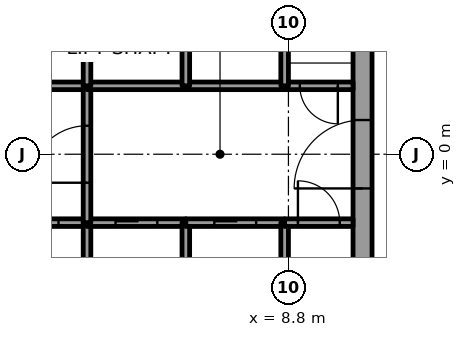
"""IFC4 building model, lengths in metres.
Left out: names, types, materials, properties, quantities, classifications, styles, units other than length and angle.
Written with IfcOpenShell. Run it as: python <this file> out.ifc"""

import sys

from ifc_helpers import new_model, si_unit, direction, frame, frame_2d, origin, place, context, subcontext, project, spatial, rectangle, extrude, element, fill, save


model = new_model("IFC4")
c1 = context("Model", 3, precision=1e-05, world=origin(), true_north=direction((0.0, 1.0)))
c2 = subcontext(c1, "Body", "Model", "MODEL_VIEW")
j1 = project(units=[si_unit("LENGTHUNIT", "METRE"), si_unit("PLANEANGLEUNIT", "RADIAN")], contexts=[c1])
p1 = place(None, origin())
s1 = spatial("IfcSite", under=j1, at=p1, CompositionType="ELEMENT")
p2 = place(p1, origin())
s2 = spatial("IfcBuilding", under=s1, at=p2, CompositionType="ELEMENT")
p3 = place(p2, frame((0.0, 0.0, 70.2)))
s3 = spatial("IfcBuildingStorey", under=s2, at=p3, CompositionType="ELEMENT", Elevation=70.2)
p4 = place(p3, frame((10.75, -7.5, 0.0), z_axis=(0.0, 0.0, 1.0), x_axis=(0.0, 1.0, 0.0)))
e1 = element("IfcWall", 1, at=p4, inside=s3, PredefinedType="SHEAR", context=c2, shape_type="SweptSolid", body=[
    extrude(rectangle(XDim=15.0, YDim=0.5, at=frame_2d((7.5, 0.0))), origin(), (0.0, 0.0, 1.0), 3.7),
])
p5 = place(p4, frame((6.6, 0.0, 0.0)))
e2 = element("IfcOpeningElement", 2, at=p5, cuts=e1, PredefinedType="OPENING", context=c2, shape_type="SweptSolid", body=[
    extrude(rectangle(XDim=1.8, YDim=2.1, at=frame_2d((0.9, 1.05))), frame((0.0, 0.25, 0.0), z_axis=(0.0, -1.0, 0.0), x_axis=(1.0, 0.0, 0.0)), (0.0, 0.0, 1.0), 0.5),
])
p6 = place(p3, frame((0.9, -1.8, 0.0), z_axis=(0.0, 0.0, 1.0), x_axis=(1.0, 0.0, 0.0)))
e3 = element("IfcWall", 3, at=p6, inside=s3, PredefinedType="SOLIDWALL", context=c2, shape_type="SweptSolid", body=[
    extrude(rectangle(XDim=2.6, YDim=0.2, at=frame_2d((1.3, 0.0))), origin(), (0.0, 0.0, 1.0), 3.55),
])
p7 = place(p6, frame((0.75, 0.0, 0.0)))
e4 = element("IfcOpeningElement", 4, at=p7, cuts=e3, PredefinedType="OPENING", context=c2, shape_type="SweptSolid", body=[
    extrude(rectangle(XDim=1.1, YDim=2.1, at=frame_2d((0.55, 1.05))), frame((0.0, 0.1, 0.0), z_axis=(0.0, -1.0, 0.0), x_axis=(1.0, 0.0, 0.0)), (0.0, 0.0, 1.0), 0.2),
])
p8 = place(p3, frame((3.5, 1.8, 0.0), z_axis=(0.0, 0.0, 1.0), x_axis=(-1.0, 0.0, 0.0)))
e5 = element("IfcWall", 5, at=p8, inside=s3, PredefinedType="SOLIDWALL", context=c2, shape_type="SweptSolid", body=[
    extrude(rectangle(XDim=2.6, YDim=0.2, at=frame_2d((1.3, 0.0))), origin(), (0.0, 0.0, 1.0), 3.55),
])
p9 = place(p3, frame((3.5, -4.6, 0.0), z_axis=(0.0, 0.0, 1.0), x_axis=(0.0, 1.0, 0.0)))
e6 = element("IfcWall", 6, at=p9, inside=s3, PredefinedType="SOLIDWALL", context=c2, shape_type="SweptSolid", body=[
    extrude(rectangle(XDim=2.8, YDim=0.2, at=frame_2d((1.4, 0.0))), origin(), (0.0, 0.0, 1.0), 3.55),
])
p10 = place(p3, frame((3.5, -1.8, 0.0), z_axis=(0.0, 0.0, 1.0), x_axis=(1.0, 0.0, 0.0)))
e7 = element("IfcWall", 7, at=p10, inside=s3, PredefinedType="SOLIDWALL", context=c2, shape_type="SweptSolid", body=[
    extrude(rectangle(XDim=2.6, YDim=0.2, at=frame_2d((1.3, 0.0))), origin(), (0.0, 0.0, 1.0), 3.55),
])
p11 = place(p10, frame((0.75, 0.0, 0.0)))
e8 = element("IfcOpeningElement", 8, at=p11, cuts=e7, PredefinedType="OPENING", context=c2, shape_type="SweptSolid", body=[
    extrude(rectangle(XDim=1.1, YDim=2.1, at=frame_2d((0.55, 1.05))), frame((0.0, 0.1, 0.0), z_axis=(0.0, -1.0, 0.0), x_axis=(1.0, 0.0, 0.0)), (0.0, 0.0, 1.0), 0.2),
])
p12 = place(p3, frame((3.5, -1.8, 0.0), z_axis=(0.0, 0.0, 1.0), x_axis=(0.0, 1.0, 0.0)))
e9 = element("IfcWall", 9, at=p12, inside=s3, PredefinedType="SOLIDWALL", context=c2, shape_type="SweptSolid", body=[
    extrude(rectangle(XDim=3.6, YDim=0.2, at=frame_2d((1.8, 0.0))), origin(), (0.0, 0.0, 1.0), 3.55),
])
p13 = place(p12, frame((1.05, 0.0, 0.0)))
e10 = element("IfcOpeningElement", 10, at=p13, cuts=e9, PredefinedType="OPENING", context=c2, shape_type="SweptSolid", body=[
    extrude(rectangle(XDim=1.5, YDim=2.1, at=frame_2d((0.75, 1.05))), frame((0.0, 0.1, 0.0), z_axis=(0.0, -1.0, 0.0), x_axis=(1.0, 0.0, 0.0)), (0.0, 0.0, 1.0), 0.2),
])
p14 = place(p3, frame((6.1, 1.8, 0.0), z_axis=(0.0, 0.0, 1.0), x_axis=(-1.0, 0.0, 0.0)))
e11 = element("IfcWall", 11, at=p14, inside=s3, PredefinedType="SOLIDWALL", context=c2, shape_type="SweptSolid", body=[
    extrude(rectangle(XDim=2.6, YDim=0.2, at=frame_2d((1.3, 0.0))), origin(), (0.0, 0.0, 1.0), 3.55),
])
for number, where, z_axis, x_axis in (
    (12, (3.5, 1.8, 0.0), (0.0, 0.0, 1.0), (0.0, 1.0, 0.0)),
    (13, (6.1, -4.6, 0.0), (0.0, 0.0, 1.0), (0.0, 1.0, 0.0)),
):
    element("IfcWall", number, at=place(p3, frame(where, z_axis=z_axis, x_axis=x_axis)), inside=s3, PredefinedType="SOLIDWALL", context=c2, shape_type="SweptSolid", body=[
        extrude(rectangle(XDim=2.8, YDim=0.2, at=frame_2d((1.4, 0.0))), origin(), (0.0, 0.0, 1.0), 3.55),
    ])
p15 = place(p3, frame((6.1, -1.8, 0.0), z_axis=(0.0, 0.0, 1.0), x_axis=(1.0, 0.0, 0.0)))
e14 = element("IfcWall", 14, at=p15, inside=s3, PredefinedType="SOLIDWALL", context=c2, shape_type="SweptSolid", body=[
    extrude(rectangle(XDim=2.6, YDim=0.2, at=frame_2d((1.3, 0.0))), origin(), (0.0, 0.0, 1.0), 3.55),
])
p16 = place(p15, frame((0.75, 0.0, 0.0)))
e15 = element("IfcOpeningElement", 15, at=p16, cuts=e14, PredefinedType="OPENING", context=c2, shape_type="SweptSolid", body=[
    extrude(rectangle(XDim=1.1, YDim=2.1, at=frame_2d((0.55, 1.05))), frame((0.0, 0.1, 0.0), z_axis=(0.0, -1.0, 0.0), x_axis=(1.0, 0.0, 0.0)), (0.0, 0.0, 1.0), 0.2),
])
p17 = place(p3, frame((8.7, 1.8, 0.0), z_axis=(0.0, 0.0, 1.0), x_axis=(-1.0, 0.0, 0.0)))
e16 = element("IfcWall", 16, at=p17, inside=s3, PredefinedType="SOLIDWALL", context=c2, shape_type="SweptSolid", body=[
    extrude(rectangle(XDim=2.6, YDim=0.2, at=frame_2d((1.3, 0.0))), origin(), (0.0, 0.0, 1.0), 3.55),
])
for number, where, z_axis, x_axis in (
    (17, (6.1, 1.8, 0.0), (0.0, 0.0, 1.0), (0.0, 1.0, 0.0)),
    (18, (8.7, -1.8, 0.0), (0.0, 0.0, 1.0), (0.0, -1.0, 0.0)),
):
    element("IfcWall", number, at=place(p3, frame(where, z_axis=z_axis, x_axis=x_axis)), inside=s3, PredefinedType="SOLIDWALL", context=c2, shape_type="SweptSolid", body=[
        extrude(rectangle(XDim=2.8, YDim=0.2, at=frame_2d((1.4, 0.0))), origin(), (0.0, 0.0, 1.0), 3.55),
    ])
p18 = place(p3, frame((8.7, -1.8, 0.0), z_axis=(0.0, 0.0, 1.0), x_axis=(1.0, 0.0, 0.0)))
e19 = element("IfcWall", 19, at=p18, inside=s3, PredefinedType="SOLIDWALL", context=c2, shape_type="SweptSolid", body=[
    extrude(rectangle(XDim=1.8, YDim=0.2, at=frame_2d((0.9, 0.0))), origin(), (0.0, 0.0, 1.0), 3.55),
])
p19 = place(p18, frame((0.35, 0.0, 0.0)))
e20 = element("IfcOpeningElement", 20, at=p19, cuts=e19, PredefinedType="OPENING", context=c2, shape_type="SweptSolid", body=[
    extrude(rectangle(XDim=1.1, YDim=2.1, at=frame_2d((0.55, 1.05))), frame((0.0, 0.1, 0.0), z_axis=(0.0, -1.0, 0.0), x_axis=(1.0, 0.0, 0.0)), (0.0, 0.0, 1.0), 0.2),
])
p20 = place(p3, frame((10.5, 1.8, 0.0), z_axis=(0.0, 0.0, 1.0), x_axis=(-1.0, 0.0, 0.0)))
e21 = element("IfcWall", 21, at=p20, inside=s3, PredefinedType="SOLIDWALL", context=c2, shape_type="SweptSolid", body=[
    extrude(rectangle(XDim=1.8, YDim=0.2, at=frame_2d((0.9, 0.0))), origin(), (0.0, 0.0, 1.0), 3.55),
])
p21 = place(p20, frame((0.4, 0.0, 0.0)))
e22 = element("IfcOpeningElement", 22, at=p21, cuts=e21, PredefinedType="OPENING", context=c2, shape_type="SweptSolid", body=[
    extrude(rectangle(XDim=1.0, YDim=2.1, at=frame_2d((0.5, 1.05))), frame((0.0, 0.1, 0.0), z_axis=(0.0, -1.0, 0.0), x_axis=(1.0, 0.0, 0.0)), (0.0, 0.0, 1.0), 0.2),
])
p22 = place(p3, frame((8.7, 4.6, 0.0), z_axis=(0.0, 0.0, 1.0), x_axis=(0.0, -1.0, 0.0)))
e23 = element("IfcWall", 23, at=p22, inside=s3, PredefinedType="SOLIDWALL", context=c2, shape_type="SweptSolid", body=[
    extrude(rectangle(XDim=2.8, YDim=0.2, at=frame_2d((1.4, 0.0))), origin(), (0.0, 0.0, 1.0), 3.55),
])
p23 = place(p7, origin())
e24 = element("IfcDoor", 24, at=p23, inside=s3, OperationType="SLIDING_TO_RIGHT", PredefinedType="DOOR", context=c2, shape_type="SweptSolid", body=[
    extrude(rectangle(XDim=1.1, YDim=2.1, at=frame_2d((0.55, 1.05))), frame((0.0, 0.025, 0.0), z_axis=(0.0, -1.0, 0.0), x_axis=(1.0, 0.0, 0.0)), (0.0, 0.0, 1.0), 0.05),
])
fill(e4, e24)
p24 = place(p11, origin())
e25 = element("IfcDoor", 25, at=p24, inside=s3, OperationType="SLIDING_TO_LEFT", PredefinedType="DOOR", context=c2, shape_type="SweptSolid", body=[
    extrude(rectangle(XDim=1.1, YDim=2.1, at=frame_2d((0.55, 1.05))), frame((0.0, 0.025, 0.0), z_axis=(0.0, -1.0, 0.0), x_axis=(1.0, 0.0, 0.0)), (0.0, 0.0, 1.0), 0.05),
])
fill(e8, e25)
p25 = place(p16, origin())
e26 = element("IfcDoor", 26, at=p25, inside=s3, OperationType="SLIDING_TO_LEFT", PredefinedType="DOOR", context=c2, shape_type="SweptSolid", body=[
    extrude(rectangle(XDim=1.1, YDim=2.1, at=frame_2d((0.55, 1.05))), frame((0.0, 0.025, 0.0), z_axis=(0.0, -1.0, 0.0), x_axis=(1.0, 0.0, 0.0)), (0.0, 0.0, 1.0), 0.05),
])
fill(e15, e26)
p26 = place(p13, origin())
e27 = element("IfcDoor", 27, at=p26, inside=s3, OperationType="DOUBLE_DOOR_SINGLE_SWING", PredefinedType="DOOR", context=c2, shape_type="SweptSolid", body=[
    extrude(rectangle(XDim=1.5, YDim=2.1, at=frame_2d((0.75, 1.05))), frame((0.0, 0.025, 0.0), z_axis=(0.0, -1.0, 0.0), x_axis=(1.0, 0.0, 0.0)), (0.0, 0.0, 1.0), 0.05),
])
fill(e10, e27)
p27 = place(p19, origin())
e28 = element("IfcDoor", 28, at=p27, inside=s3, OperationType="SINGLE_SWING_LEFT", PredefinedType="DOOR", context=c2, shape_type="SweptSolid", body=[
    extrude(rectangle(XDim=1.1, YDim=2.1, at=frame_2d((0.55, 1.05))), frame((0.0, 0.025, 0.0), z_axis=(0.0, -1.0, 0.0), x_axis=(1.0, 0.0, 0.0)), (0.0, 0.0, 1.0), 0.05),
])
fill(e20, e28)
p28 = place(p21, origin())
e29 = element("IfcDoor", 29, at=p28, inside=s3, OperationType="SINGLE_SWING_RIGHT", PredefinedType="DOOR", context=c2, shape_type="SweptSolid", body=[
    extrude(rectangle(XDim=1.0, YDim=2.1, at=frame_2d((0.5, 1.05))), frame((0.0, 0.025, 0.0), z_axis=(0.0, -1.0, 0.0), x_axis=(1.0, 0.0, 0.0)), (0.0, 0.0, 1.0), 0.05),
])
fill(e22, e29)
p29 = place(p5, origin())
e30 = element("IfcDoor", 30, at=p29, inside=s3, OperationType="DOUBLE_DOOR_SINGLE_SWING", PredefinedType="DOOR", context=c2, shape_type="SweptSolid", body=[
    extrude(rectangle(XDim=1.8, YDim=2.1, at=frame_2d((0.9, 1.05))), frame((0.0, 0.025, 0.0), z_axis=(0.0, -1.0, 0.0), x_axis=(1.0, 0.0, 0.0)), (0.0, 0.0, 1.0), 0.05),
])
fill(e2, e30)
save(model, sys.argv[1])
